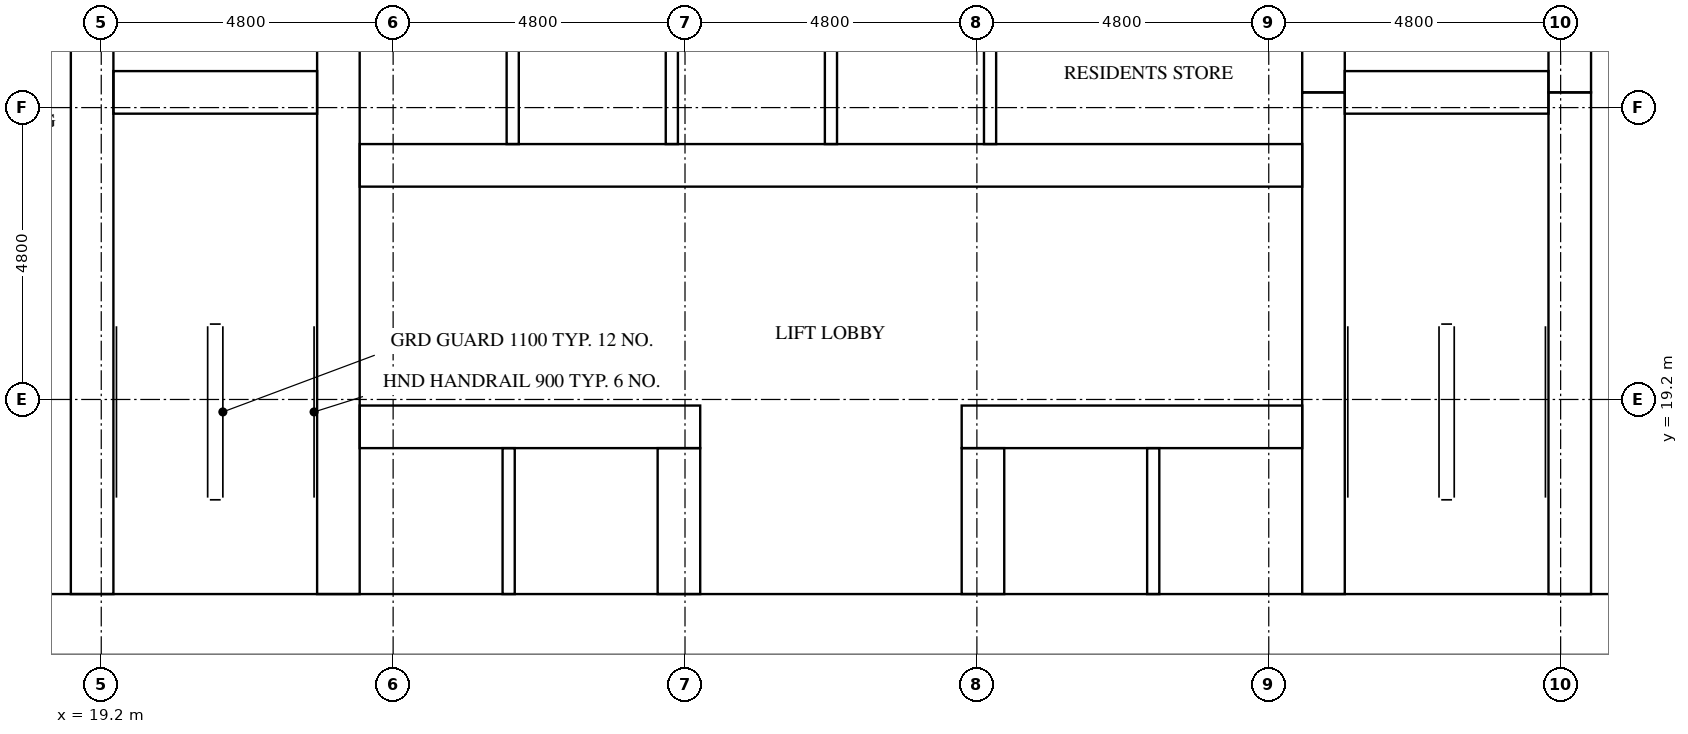
"""IFC4 building model, lengths in metres.
Left out: names, types, materials, properties, quantities, classifications, styles, units other than length and angle.
Written with IfcOpenShell. Run it as: python <this file> out.ifc"""

import sys

from ifc_helpers import new_model, si_unit, direction, frame, frame_2d, origin, place, context, subcontext, project, spatial, rectangle, extrude, element, fill, save


model = new_model("IFC4")
c1 = context("Model", 3, precision=1e-05, world=origin(), true_north=direction((0.0, 1.0)))
c2 = subcontext(c1, "Body", "Model", "MODEL_VIEW")
j1 = project(units=[si_unit("LENGTHUNIT", "METRE"), si_unit("PLANEANGLEUNIT", "RADIAN")], contexts=[c1])
p1 = place(None, origin())
s1 = spatial("IfcSite", under=j1, at=p1, CompositionType="ELEMENT")
p2 = place(p1, origin())
s2 = spatial("IfcBuilding", under=s1, at=p2, CompositionType="ELEMENT")
p3 = place(p2, frame((0.0, 0.0, 39.9)))
s3 = spatial("IfcBuildingStorey", under=s2, at=p3, CompositionType="ELEMENT", Elevation=39.9)
p4 = place(p3, frame((15.0, 15.5, 0.0), z_axis=(0.0, 0.0, 1.0), x_axis=(1.0, 0.0, 0.0)))
e1 = element("IfcWall", 1, at=p4, inside=s3, PredefinedType="SHEAR", context=c2, shape_type="SweptSolid", body=[
    extrude(rectangle(XDim=32.4, YDim=1.0, at=frame_2d((16.2, 0.0))), origin(), (0.0, 0.0, 1.0), 3.2),
])
p5 = place(p4, frame((15.3, 0.0, 0.0)))
e2 = element("IfcOpeningElement", 2, at=p5, cuts=e1, PredefinedType="OPENING", context=c2, shape_type="SweptSolid", body=[
    extrude(rectangle(XDim=1.8, YDim=2.1, at=frame_2d((0.9, 1.05))), frame((0.0, 0.51, 0.0), z_axis=(0.0, -1.0, 0.0), x_axis=(1.0, 0.0, 0.0)), (0.0, 0.0, 1.0), 1.02),
])
p6 = place(p3, frame((19.05, 16.0, 0.0), z_axis=(0.0, 0.0, 1.0), x_axis=(0.0, 1.0, 0.0)))
e3 = element("IfcWall", 3, at=p6, inside=s3, PredefinedType="SHEAR", context=c2, shape_type="SweptSolid", body=[
    extrude(rectangle(XDim=14.9, YDim=0.7, at=frame_2d((7.45, 0.0))), origin(), (0.0, 0.0, 1.0), 3.2),
])
p7 = place(p6, frame((9.45, 0.0, 0.0)))
e4 = element("IfcOpeningElement", 4, at=p7, cuts=e3, PredefinedType="OPENING", context=c2, shape_type="SweptSolid", body=[
    extrude(rectangle(XDim=1.1, YDim=2.1, at=frame_2d((0.55, 1.05))), frame((0.0, 0.36, 0.0), z_axis=(0.0, -1.0, 0.0), x_axis=(1.0, 0.0, 0.0)), (0.0, 0.0, 1.0), 0.72),
])
p8 = place(p6, frame((12.95, 0.0, 0.0)))
e5 = element("IfcOpeningElement", 5, at=p8, cuts=e3, PredefinedType="OPENING", context=c2, shape_type="SweptSolid", body=[
    extrude(rectangle(XDim=1.1, YDim=2.1, at=frame_2d((0.55, 1.05))), frame((0.0, 0.36, 0.0), z_axis=(0.0, -1.0, 0.0), x_axis=(1.0, 0.0, 0.0)), (0.0, 0.0, 1.0), 0.72),
])
p9 = place(p6, frame((0.2, 0.0, 0.0)))
e6 = element("IfcOpeningElement", 6, at=p9, cuts=e3, PredefinedType="OPENING", context=c2, shape_type="SweptSolid", body=[
    extrude(rectangle(XDim=1.2, YDim=2.1, at=frame_2d((0.6, 1.05))), frame((0.0, 0.36, 0.0), z_axis=(0.0, -1.0, 0.0), x_axis=(1.0, 0.0, 0.0)), (0.0, 0.0, 1.0), 0.72),
])
p10 = place(p3, frame((23.1, 16.0, 0.0), z_axis=(0.0, 0.0, 1.0), x_axis=(0.0, 1.0, 0.0)))
e7 = element("IfcWall", 7, at=p10, inside=s3, PredefinedType="SHEAR", context=c2, shape_type="SweptSolid", body=[
    extrude(rectangle(XDim=20.8, YDim=0.7, at=frame_2d((10.4, 0.0))), origin(), (0.0, 0.0, 1.0), 3.2),
])
p11 = place(p3, frame((39.3, 16.0, 0.0), z_axis=(0.0, 0.0, 1.0), x_axis=(0.0, 1.0, 0.0)))
e8 = element("IfcWall", 8, at=p11, inside=s3, PredefinedType="SHEAR", context=c2, shape_type="SweptSolid", body=[
    extrude(rectangle(XDim=8.25, YDim=0.7, at=frame_2d((4.125, 0.0))), origin(), (0.0, 0.0, 1.0), 3.2),
])
p12 = place(p3, frame((39.3, 24.25, 0.0), z_axis=(0.0, 0.0, 1.0), x_axis=(0.0, 1.0, 0.0)))
e9 = element("IfcWall", 9, at=p12, inside=s3, PredefinedType="SHEAR", context=c2, shape_type="SweptSolid", body=[
    extrude(rectangle(XDim=3.5, YDim=0.7, at=frame_2d((1.75, 0.0))), origin(), (0.0, 0.0, 1.0), 3.2),
])
p13 = place(p3, frame((43.35, 16.0, 0.0), z_axis=(0.0, 0.0, 1.0), x_axis=(0.0, 1.0, 0.0)))
e10 = element("IfcWall", 10, at=p13, inside=s3, PredefinedType="SHEAR", context=c2, shape_type="SweptSolid", body=[
    extrude(rectangle(XDim=8.25, YDim=0.7, at=frame_2d((4.125, 0.0))), origin(), (0.0, 0.0, 1.0), 3.2),
])
p14 = place(p13, frame((0.2, 0.0, 0.0)))
e11 = element("IfcOpeningElement", 11, at=p14, cuts=e10, PredefinedType="OPENING", context=c2, shape_type="SweptSolid", body=[
    extrude(rectangle(XDim=1.2, YDim=2.1, at=frame_2d((0.6, 1.05))), frame((0.0, 0.36, 0.0), z_axis=(0.0, -1.0, 0.0), x_axis=(1.0, 0.0, 0.0)), (0.0, 0.0, 1.0), 0.72),
])
p15 = place(p3, frame((43.35, 24.25, 0.0), z_axis=(0.0, 0.0, 1.0), x_axis=(0.0, 1.0, 0.0)))
e12 = element("IfcWall", 12, at=p15, inside=s3, PredefinedType="SHEAR", context=c2, shape_type="SweptSolid", body=[
    extrude(rectangle(XDim=3.5, YDim=0.7, at=frame_2d((1.75, 0.0))), origin(), (0.0, 0.0, 1.0), 3.2),
])
p16 = place(p15, frame((1.2, 0.0, 0.0)))
e13 = element("IfcOpeningElement", 13, at=p16, cuts=e12, PredefinedType="OPENING", context=c2, shape_type="SweptSolid", body=[
    extrude(rectangle(XDim=1.1, YDim=2.1, at=frame_2d((0.55, 1.05))), frame((0.0, 0.36, 0.0), z_axis=(0.0, -1.0, 0.0), x_axis=(1.0, 0.0, 0.0)), (0.0, 0.0, 1.0), 0.72),
])
for number, where, z_axis, x_axis in (
    (14, (19.4, 24.25, 0.0), (0.0, 0.0, 1.0), (1.0, 0.0, 0.0)),
    (15, (39.65, 24.25, 0.0), (0.0, 0.0, 1.0), (1.0, 0.0, 0.0)),
):
    element("IfcWall", number, at=place(p3, frame(where, z_axis=z_axis, x_axis=x_axis)), inside=s3, PredefinedType="SHEAR", context=c2, shape_type="SweptSolid", body=[
        extrude(rectangle(XDim=3.35, YDim=0.7, at=frame_2d((1.675, 0.0))), origin(), (0.0, 0.0, 1.0), 3.2),
    ])
p17 = place(p3, frame((23.45, 18.75, 0.0), z_axis=(0.0, 0.0, 1.0), x_axis=(1.0, 0.0, 0.0)))
e16 = element("IfcWall", 16, at=p17, inside=s3, PredefinedType="SHEAR", context=c2, shape_type="SweptSolid", body=[
    extrude(rectangle(XDim=5.6, YDim=0.7, at=frame_2d((2.8, 0.0))), origin(), (0.0, 0.0, 1.0), 3.2),
])
p18 = place(p17, frame((0.625, 0.0, 0.0)))
e17 = element("IfcOpeningElement", 17, at=p18, cuts=e16, PredefinedType="OPENING", context=c2, shape_type="SweptSolid", body=[
    extrude(rectangle(XDim=1.1, YDim=2.1, at=frame_2d((0.55, 1.05))), frame((0.0, 0.36, 0.0), z_axis=(0.0, -1.0, 0.0), x_axis=(1.0, 0.0, 0.0)), (0.0, 0.0, 1.0), 0.72),
])
p19 = place(p17, frame((3.175, 0.0, 0.0)))
e18 = element("IfcOpeningElement", 18, at=p19, cuts=e16, PredefinedType="OPENING", context=c2, shape_type="SweptSolid", body=[
    extrude(rectangle(XDim=1.1, YDim=2.1, at=frame_2d((0.55, 1.05))), frame((0.0, 0.36, 0.0), z_axis=(0.0, -1.0, 0.0), x_axis=(1.0, 0.0, 0.0)), (0.0, 0.0, 1.0), 0.72),
])
p20 = place(p3, frame((33.35, 18.75, 0.0), z_axis=(0.0, 0.0, 1.0), x_axis=(1.0, 0.0, 0.0)))
e19 = element("IfcWall", 19, at=p20, inside=s3, PredefinedType="SHEAR", context=c2, shape_type="SweptSolid", body=[
    extrude(rectangle(XDim=5.6, YDim=0.7, at=frame_2d((2.8, 0.0))), origin(), (0.0, 0.0, 1.0), 3.2),
])
p21 = place(p20, frame((1.325, 0.0, 0.0)))
e20 = element("IfcOpeningElement", 20, at=p21, cuts=e19, PredefinedType="OPENING", context=c2, shape_type="SweptSolid", body=[
    extrude(rectangle(XDim=1.1, YDim=2.1, at=frame_2d((0.55, 1.05))), frame((0.0, 0.36, 0.0), z_axis=(0.0, -1.0, 0.0), x_axis=(1.0, 0.0, 0.0)), (0.0, 0.0, 1.0), 0.72),
])
p22 = place(p20, frame((3.875, 0.0, 0.0)))
e21 = element("IfcOpeningElement", 21, at=p22, cuts=e19, PredefinedType="OPENING", context=c2, shape_type="SweptSolid", body=[
    extrude(rectangle(XDim=1.1, YDim=2.1, at=frame_2d((0.55, 1.05))), frame((0.0, 0.36, 0.0), z_axis=(0.0, -1.0, 0.0), x_axis=(1.0, 0.0, 0.0)), (0.0, 0.0, 1.0), 0.72),
])
p23 = place(p3, frame((23.45, 23.05, 0.0), z_axis=(0.0, 0.0, 1.0), x_axis=(1.0, 0.0, 0.0)))
e22 = element("IfcWall", 22, at=p23, inside=s3, PredefinedType="SHEAR", context=c2, shape_type="SweptSolid", body=[
    extrude(rectangle(XDim=15.5, YDim=0.7, at=frame_2d((7.75, 0.0))), origin(), (0.0, 0.0, 1.0), 3.2),
])
p24 = place(p23, frame((0.658, 0.0, 0.0)))
e23 = element("IfcOpeningElement", 23, at=p24, cuts=e22, PredefinedType="OPENING", context=c2, shape_type="SweptSolid", body=[
    extrude(rectangle(XDim=1.1, YDim=2.1, at=frame_2d((0.55, 1.05))), frame((0.0, 0.36, 0.0), z_axis=(0.0, -1.0, 0.0), x_axis=(1.0, 0.0, 0.0)), (0.0, 0.0, 1.0), 0.72),
])
p25 = place(p23, frame((3.275, 0.0, 0.0)))
e24 = element("IfcOpeningElement", 24, at=p25, cuts=e22, PredefinedType="OPENING", context=c2, shape_type="SweptSolid", body=[
    extrude(rectangle(XDim=1.1, YDim=2.1, at=frame_2d((0.55, 1.05))), frame((0.0, 0.36, 0.0), z_axis=(0.0, -1.0, 0.0), x_axis=(1.0, 0.0, 0.0)), (0.0, 0.0, 1.0), 0.72),
])
p26 = place(p23, frame((12.483, 0.0, 0.0)))
e25 = element("IfcOpeningElement", 25, at=p26, cuts=e22, PredefinedType="OPENING", context=c2, shape_type="SweptSolid", body=[
    extrude(rectangle(XDim=1.0, YDim=2.1, at=frame_2d((0.5, 1.05))), frame((0.0, 0.36, 0.0), z_axis=(0.0, -1.0, 0.0), x_axis=(1.0, 0.0, 0.0)), (0.0, 0.0, 1.0), 0.72),
])
for number, where, z_axis, x_axis in (
    (26, (28.7, 16.0, 0.0), (0.0, 0.0, 1.0), (0.0, 1.0, 0.0)),
    (27, (33.7, 16.0, 0.0), (0.0, 0.0, 1.0), (0.0, 1.0, 0.0)),
):
    element("IfcWall", number, at=place(p3, frame(where, z_axis=z_axis, x_axis=x_axis)), inside=s3, PredefinedType="SHEAR", context=c2, shape_type="SweptSolid", body=[
        extrude(rectangle(XDim=2.4, YDim=0.7, at=frame_2d((1.2, 0.0))), origin(), (0.0, 0.0, 1.0), 3.2),
    ])
for number, where, z_axis, x_axis in (
    (28, (25.967, 23.4, 0.0), (0.0, 0.0, 1.0), (0.0, 1.0, 0.0)),
    (29, (28.583, 23.4, 0.0), (0.0, 0.0, 1.0), (0.0, 1.0, 0.0)),
    (30, (31.2, 23.4, 0.0), (0.0, 0.0, 1.0), (0.0, 1.0, 0.0)),
    (31, (33.817, 23.4, 0.0), (0.0, 0.0, 1.0), (0.0, 1.0, 0.0)),
):
    element("IfcWall", number, at=place(p3, frame(where, z_axis=z_axis, x_axis=x_axis)), inside=s3, PredefinedType="SOLIDWALL", context=c2, shape_type="SweptSolid", body=[
        extrude(rectangle(XDim=2.4, YDim=0.2, at=frame_2d((1.2, 0.0))), origin(), (0.0, 0.0, 1.0), 3.2),
    ])
for number, where, z_axis, x_axis in (
    (32, (25.9, 16.0, 0.0), (0.0, 0.0, 1.0), (0.0, 1.0, 0.0)),
    (33, (36.5, 16.0, 0.0), (0.0, 0.0, 1.0), (0.0, 1.0, 0.0)),
):
    element("IfcWall", number, at=place(p3, frame(where, z_axis=z_axis, x_axis=x_axis)), inside=s3, PredefinedType="SOLIDWALL", context=c2, shape_type="SweptSolid", body=[
        extrude(rectangle(XDim=2.4, YDim=0.2, at=frame_2d((1.2, 0.0))), origin(), (0.0, 0.0, 1.0), 3.2),
    ])
p27 = place(p18, origin())
e34 = element("IfcDoor", 34, at=p27, inside=s3, OperationType="DOUBLE_DOOR_SLIDING", PredefinedType="DOOR", context=c2, shape_type="SweptSolid", body=[
    extrude(rectangle(XDim=1.1, YDim=2.1, at=frame_2d((0.55, 1.05))), frame((0.0, 0.025, 0.0), z_axis=(0.0, -1.0, 0.0), x_axis=(1.0, 0.0, 0.0)), (0.0, 0.0, 1.0), 0.05),
])
fill(e17, e34)
p28 = place(p19, origin())
e35 = element("IfcDoor", 35, at=p28, inside=s3, OperationType="DOUBLE_DOOR_SLIDING", PredefinedType="DOOR", context=c2, shape_type="SweptSolid", body=[
    extrude(rectangle(XDim=1.1, YDim=2.1, at=frame_2d((0.55, 1.05))), frame((0.0, 0.025, 0.0), z_axis=(0.0, -1.0, 0.0), x_axis=(1.0, 0.0, 0.0)), (0.0, 0.0, 1.0), 0.05),
])
fill(e18, e35)
p29 = place(p21, origin())
e36 = element("IfcDoor", 36, at=p29, inside=s3, OperationType="DOUBLE_DOOR_SLIDING", PredefinedType="DOOR", context=c2, shape_type="SweptSolid", body=[
    extrude(rectangle(XDim=1.1, YDim=2.1, at=frame_2d((0.55, 1.05))), frame((0.0, 0.025, 0.0), z_axis=(0.0, -1.0, 0.0), x_axis=(1.0, 0.0, 0.0)), (0.0, 0.0, 1.0), 0.05),
])
fill(e20, e36)
p30 = place(p22, origin())
e37 = element("IfcDoor", 37, at=p30, inside=s3, OperationType="DOUBLE_DOOR_SLIDING", PredefinedType="DOOR", context=c2, shape_type="SweptSolid", body=[
    extrude(rectangle(XDim=1.1, YDim=2.1, at=frame_2d((0.55, 1.05))), frame((0.0, 0.025, 0.0), z_axis=(0.0, -1.0, 0.0), x_axis=(1.0, 0.0, 0.0)), (0.0, 0.0, 1.0), 0.05),
])
fill(e21, e37)
p31 = place(p24, origin())
e38 = element("IfcDoor", 38, at=p31, inside=s3, OperationType="DOUBLE_DOOR_SLIDING", PredefinedType="DOOR", context=c2, shape_type="SweptSolid", body=[
    extrude(rectangle(XDim=1.1, YDim=2.1, at=frame_2d((0.55, 1.05))), frame((0.0, 0.025, 0.0), z_axis=(0.0, -1.0, 0.0), x_axis=(1.0, 0.0, 0.0)), (0.0, 0.0, 1.0), 0.05),
])
fill(e23, e38)
p32 = place(p25, origin())
e39 = element("IfcDoor", 39, at=p32, inside=s3, OperationType="DOUBLE_DOOR_SLIDING", PredefinedType="DOOR", context=c2, shape_type="SweptSolid", body=[
    extrude(rectangle(XDim=1.1, YDim=2.1, at=frame_2d((0.55, 1.05))), frame((0.0, 0.025, 0.0), z_axis=(0.0, -1.0, 0.0), x_axis=(1.0, 0.0, 0.0)), (0.0, 0.0, 1.0), 0.05),
])
fill(e24, e39)
p33 = place(p9, frame((1.2, 0.0, 0.0), z_axis=(0.0, 0.0, 1.0), x_axis=(-1.0, 0.0, 0.0)))
e40 = element("IfcDoor", 40, at=p33, inside=s3, OperationType="SINGLE_SWING_LEFT", PredefinedType="DOOR", context=c2, shape_type="SweptSolid", body=[
    extrude(rectangle(XDim=1.2, YDim=2.1, at=frame_2d((0.6, 1.05))), frame((0.0, 0.025, 0.0), z_axis=(0.0, -1.0, 0.0), x_axis=(1.0, 0.0, 0.0)), (0.0, 0.0, 1.0), 0.05),
])
fill(e6, e40)
p34 = place(p14, origin())
e41 = element("IfcDoor", 41, at=p34, inside=s3, OperationType="SINGLE_SWING_RIGHT", PredefinedType="DOOR", context=c2, shape_type="SweptSolid", body=[
    extrude(rectangle(XDim=1.2, YDim=2.1, at=frame_2d((0.6, 1.05))), frame((0.0, 0.025, 0.0), z_axis=(0.0, -1.0, 0.0), x_axis=(1.0, 0.0, 0.0)), (0.0, 0.0, 1.0), 0.05),
])
fill(e11, e41)
p35 = place(p5, frame((1.8, 0.0, 0.0), z_axis=(0.0, 0.0, 1.0), x_axis=(-1.0, 0.0, 0.0)))
e42 = element("IfcDoor", 42, at=p35, inside=s3, OperationType="DOUBLE_DOOR_SINGLE_SWING", PredefinedType="DOOR", context=c2, shape_type="SweptSolid", body=[
    extrude(rectangle(XDim=1.8, YDim=2.1, at=frame_2d((0.9, 1.05))), frame((0.0, 0.025, 0.0), z_axis=(0.0, -1.0, 0.0), x_axis=(1.0, 0.0, 0.0)), (0.0, 0.0, 1.0), 0.05),
])
fill(e2, e42)
p36 = place(p26, frame((1.0, 0.0, 0.0), z_axis=(0.0, 0.0, 1.0), x_axis=(-1.0, 0.0, 0.0)))
e43 = element("IfcDoor", 43, at=p36, inside=s3, OperationType="SINGLE_SWING_RIGHT", PredefinedType="DOOR", context=c2, shape_type="SweptSolid", body=[
    extrude(rectangle(XDim=1.0, YDim=2.1, at=frame_2d((0.5, 1.05))), frame((0.0, 0.025, 0.0), z_axis=(0.0, -1.0, 0.0), x_axis=(1.0, 0.0, 0.0)), (0.0, 0.0, 1.0), 0.05),
])
fill(e25, e43)
save(model, sys.argv[1])
